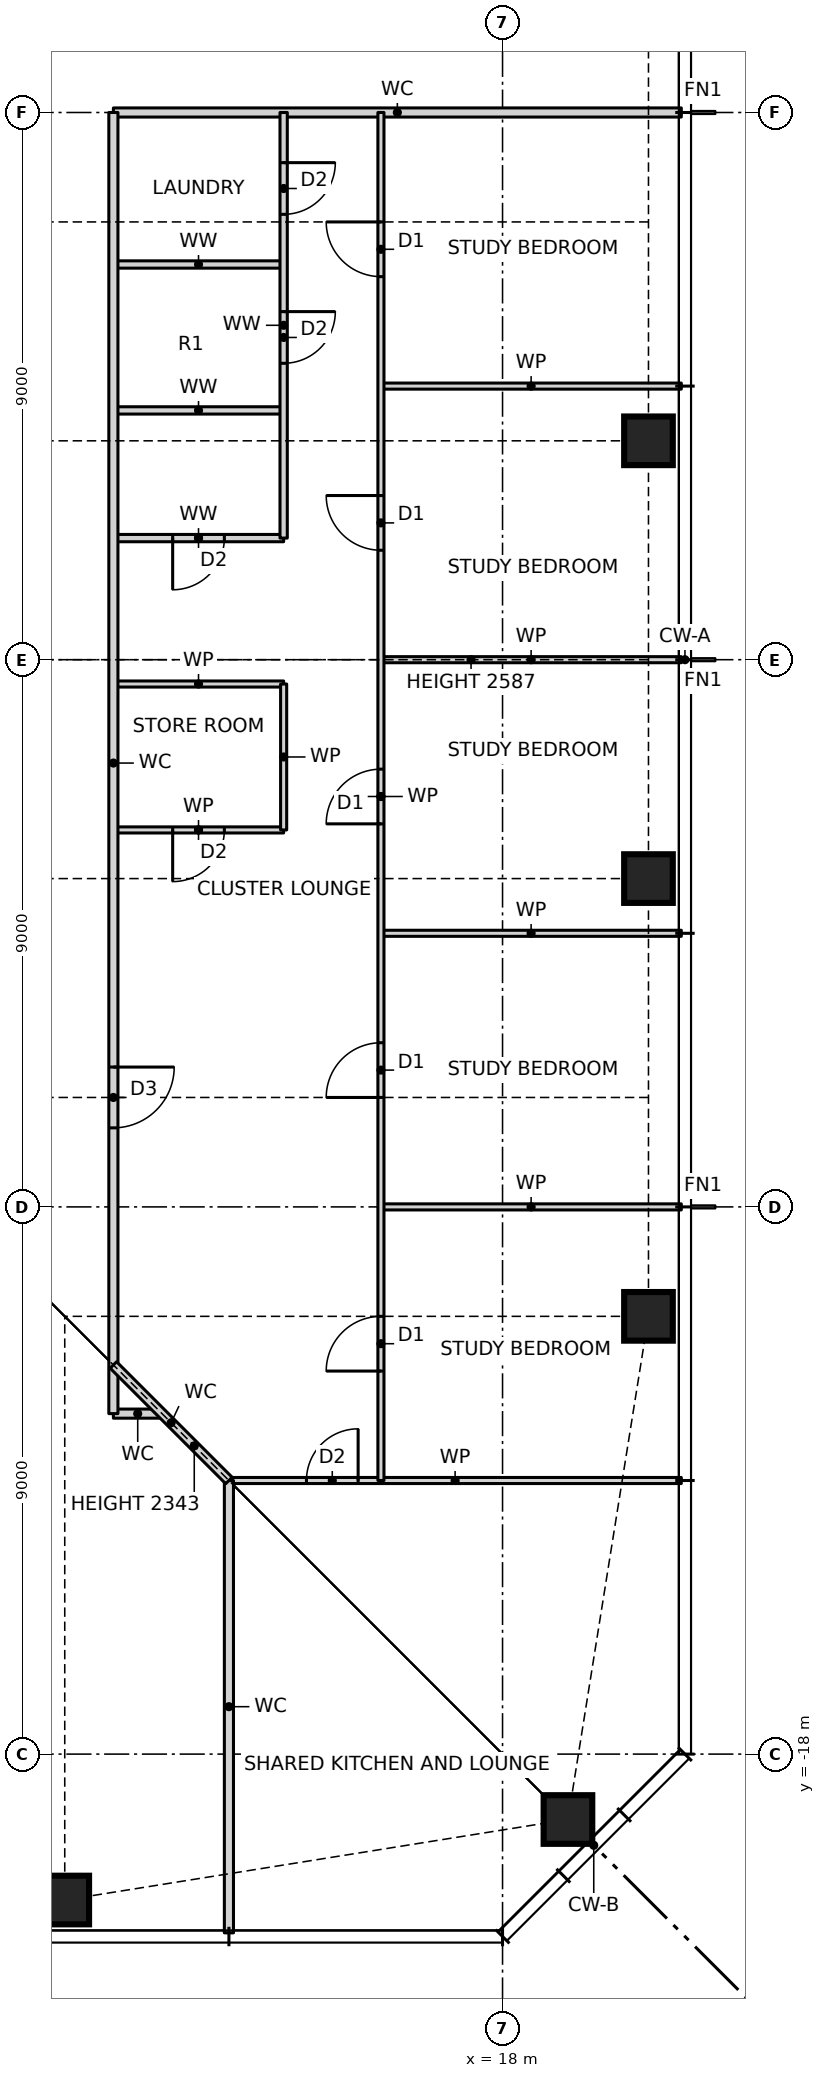
"""IFC4 building model, lengths in metres.
Left out: names, types, materials, properties, quantities, classifications, styles, units other than length and angle.
Written with IfcOpenShell. Run it as: python <this file> out.ifc"""

import sys

from ifc_helpers import new_model, si_unit, direction, frame, frame_2d, origin, origin_2d, place, context, subcontext, project, spatial, rectangle, hollow_rectangle, extrude, element, fill, save


model = new_model("IFC4")
c1 = context("Model", 3, precision=1e-05, world=origin(), true_north=direction((0.0, 1.0)))
c2 = subcontext(c1, "Body", "Model", "MODEL_VIEW")
j1 = project(units=[si_unit("LENGTHUNIT", "METRE"), si_unit("PLANEANGLEUNIT", "RADIAN")], contexts=[c1])
p1 = place(None, origin())
s1 = spatial("IfcSite", under=j1, at=p1, CompositionType="ELEMENT")
p2 = place(p1, origin())
s2 = spatial("IfcBuilding", under=s1, at=p2, CompositionType="ELEMENT")
p3 = place(p2, frame((0.0, 0.0, 91.0)))
s3 = spatial("IfcBuildingStorey", under=s2, at=p3, CompositionType="ELEMENT", Elevation=91.0)
for number, where, z_axis, x_axis in (
    (1, (10.8, -20.4, 0.0), (0.0, 0.0, 1.0), (1.0, 0.0, 0.0)),
    (2, (19.076, -19.076, 0.0), (0.0, 0.0, 1.0), (1.0, 0.0, 0.0)),
    (3, (20.4, -10.8, 0.0), (0.0, 0.0, 1.0), (1.0, 0.0, 0.0)),
    (4, (20.4, -3.6, 0.0), (0.0, 0.0, 1.0), (1.0, 0.0, 0.0)),
    (5, (20.4, 3.6, 0.0), (0.0, 0.0, 1.0), (1.0, 0.0, 0.0)),
):
    element("IfcColumn", number, at=place(p3, frame(where, z_axis=z_axis, x_axis=x_axis)), inside=s3, PredefinedType="COLUMN", context=c2, shape_type="SweptSolid", body=[
        extrude(hollow_rectangle(XDim=0.8, YDim=0.8, WallThickness=0.07, at=origin_2d()), origin(), (0.0, 0.0, 1.0), 3.5),
    ])
p4 = place(p3, frame((13.5, -13.5, 0.0), z_axis=(0.0, 0.0, 1.0), x_axis=(1.0, 0.0, 0.0)))
e6 = element("IfcWall", 6, at=p4, inside=s3, PredefinedType="PARTITIONING", context=c2, shape_type="SweptSolid", body=[
    extrude(rectangle(XDim=7.44, YDim=0.1, at=frame_2d((3.72, 0.0))), origin(), (0.0, 0.0, 1.0), 3.27),
])
p5 = place(p4, frame((1.275, 0.0, 0.0)))
e7 = element("IfcOpeningElement", 7, at=p5, cuts=e6, PredefinedType="OPENING", context=c2, shape_type="SweptSolid", body=[
    extrude(rectangle(XDim=0.85, YDim=2.1, at=frame_2d((0.425, 1.05))), frame((0.0, 0.06, 0.0), z_axis=(0.0, -1.0, 0.0), x_axis=(1.0, 0.0, 0.0)), (0.0, 0.0, 1.0), 0.12),
])
p6 = place(p3, frame((11.6, -12.4, 0.0), z_axis=(0.0, 0.0, 1.0), x_axis=(1.0, 0.0, 0.0)))
e8 = element("IfcWall", 8, at=p6, inside=s3, PredefinedType="PARTITIONING", context=c2, shape_type="SweptSolid", body=[
    extrude(rectangle(XDim=0.8, YDim=0.15, at=frame_2d((0.4, 0.0))), origin(), (0.0, 0.0, 1.0), 3.27),
])
for number, where, z_axis, x_axis in (
    (9, (16.0, -9.0, 0.0), (0.0, 0.0, 1.0), (1.0, 0.0, 0.0)),
    (10, (16.0, -4.5, 0.0), (0.0, 0.0, 1.0), (1.0, 0.0, 0.0)),
):
    element("IfcWall", number, at=place(p3, frame(where, z_axis=z_axis, x_axis=x_axis)), inside=s3, PredefinedType="PARTITIONING", context=c2, shape_type="SweptSolid", body=[
        extrude(rectangle(XDim=4.94, YDim=0.1, at=frame_2d((2.47, 0.0))), origin(), (0.0, 0.0, 1.0), 3.27),
    ])
p7 = place(p3, frame((11.6, -2.8, 0.0), z_axis=(0.0, 0.0, 1.0), x_axis=(1.0, 0.0, 0.0)))
e11 = element("IfcWall", 11, at=p7, inside=s3, PredefinedType="PARTITIONING", context=c2, shape_type="SweptSolid", body=[
    extrude(rectangle(XDim=2.8, YDim=0.1, at=frame_2d((1.4, 0.0))), origin(), (0.0, 0.0, 1.0), 3.27),
])
p8 = place(p7, frame((0.975, 0.0, 0.0)))
e12 = element("IfcOpeningElement", 12, at=p8, cuts=e11, PredefinedType="OPENING", context=c2, shape_type="SweptSolid", body=[
    extrude(rectangle(XDim=0.85, YDim=2.1, at=frame_2d((0.425, 1.05))), frame((0.0, 0.06, 0.0), z_axis=(0.0, -1.0, 0.0), x_axis=(1.0, 0.0, 0.0)), (0.0, 0.0, 1.0), 0.12),
])
p9 = place(p3, frame((11.6, -0.4, 0.0), z_axis=(0.0, 0.0, 1.0), x_axis=(1.0, 0.0, 0.0)))
e13 = element("IfcWall", 13, at=p9, inside=s3, PredefinedType="PARTITIONING", context=c2, shape_type="SweptSolid", body=[
    extrude(rectangle(XDim=2.8, YDim=0.1, at=frame_2d((1.4, 0.0))), origin(), (0.0, 0.0, 1.0), 3.27),
])
p10 = place(p3, frame((16.0, 0.0, 0.0), z_axis=(0.0, 0.0, 1.0), x_axis=(1.0, 0.0, 0.0)))
e14 = element("IfcWall", 14, at=p10, inside=s3, PredefinedType="PARTITIONING", context=c2, shape_type="SweptSolid", body=[
    extrude(rectangle(XDim=4.94, YDim=0.1, at=frame_2d((2.47, 0.0))), origin(), (0.0, 0.0, 1.0), 2.587),
])
p11 = place(p3, frame((11.6, 2.0, 0.0), z_axis=(0.0, 0.0, 1.0), x_axis=(1.0, 0.0, 0.0)))
e15 = element("IfcWall", 15, at=p11, inside=s3, PredefinedType="PARTITIONING", context=c2, shape_type="SweptSolid", body=[
    extrude(rectangle(XDim=2.8, YDim=0.12, at=frame_2d((1.4, 0.0))), origin(), (0.0, 0.0, 1.0), 3.27),
])
p12 = place(p11, frame((0.975, 0.0, 0.0)))
e16 = element("IfcOpeningElement", 16, at=p12, cuts=e15, PredefinedType="OPENING", context=c2, shape_type="SweptSolid", body=[
    extrude(rectangle(XDim=0.85, YDim=2.1, at=frame_2d((0.425, 1.05))), frame((0.0, 0.07, 0.0), z_axis=(0.0, -1.0, 0.0), x_axis=(1.0, 0.0, 0.0)), (0.0, 0.0, 1.0), 0.14),
])
p13 = place(p3, frame((11.6, 4.1, 0.0), z_axis=(0.0, 0.0, 1.0), x_axis=(1.0, 0.0, 0.0)))
e17 = element("IfcWall", 17, at=p13, inside=s3, PredefinedType="PARTITIONING", context=c2, shape_type="SweptSolid", body=[
    extrude(rectangle(XDim=2.8, YDim=0.12, at=frame_2d((1.4, 0.0))), origin(), (0.0, 0.0, 1.0), 3.27),
])
p14 = place(p3, frame((16.0, 4.5, 0.0), z_axis=(0.0, 0.0, 1.0), x_axis=(1.0, 0.0, 0.0)))
e18 = element("IfcWall", 18, at=p14, inside=s3, PredefinedType="PARTITIONING", context=c2, shape_type="SweptSolid", body=[
    extrude(rectangle(XDim=4.94, YDim=0.1, at=frame_2d((2.47, 0.0))), origin(), (0.0, 0.0, 1.0), 3.27),
])
p15 = place(p3, frame((11.6, 6.5, 0.0), z_axis=(0.0, 0.0, 1.0), x_axis=(1.0, 0.0, 0.0)))
e19 = element("IfcWall", 19, at=p15, inside=s3, PredefinedType="PARTITIONING", context=c2, shape_type="SweptSolid", body=[
    extrude(rectangle(XDim=2.8, YDim=0.12, at=frame_2d((1.4, 0.0))), origin(), (0.0, 0.0, 1.0), 3.27),
])
p16 = place(p3, frame((11.6, 9.0, 0.0), z_axis=(0.0, 0.0, 1.0), x_axis=(1.0, 0.0, 0.0)))
e20 = element("IfcWall", 20, at=p16, inside=s3, PredefinedType="PARTITIONING", context=c2, shape_type="SweptSolid", body=[
    extrude(rectangle(XDim=9.34, YDim=0.15, at=frame_2d((4.67, 0.0))), origin(), (0.0, 0.0, 1.0), 3.27),
])
p17 = place(p3, frame((16.0, -13.5, 0.0), z_axis=(0.0, 0.0, 1.0), x_axis=(0.0, 1.0, 0.0)))
e21 = element("IfcWall", 21, at=p17, inside=s3, PredefinedType="PARTITIONING", context=c2, shape_type="SweptSolid", body=[
    extrude(rectangle(XDim=22.5, YDim=0.1, at=frame_2d((11.25, 0.0))), origin(), (0.0, 0.0, 1.0), 3.27),
])
p18 = place(p17, frame((1.8, 0.0, 0.0)))
e22 = element("IfcOpeningElement", 22, at=p18, cuts=e21, PredefinedType="OPENING", context=c2, shape_type="SweptSolid", body=[
    extrude(rectangle(XDim=0.9, YDim=2.1, at=frame_2d((0.45, 1.05))), frame((0.0, 0.06, 0.0), z_axis=(0.0, -1.0, 0.0), x_axis=(1.0, 0.0, 0.0)), (0.0, 0.0, 1.0), 0.12),
])
p19 = place(p17, frame((6.3, 0.0, 0.0)))
e23 = element("IfcOpeningElement", 23, at=p19, cuts=e21, PredefinedType="OPENING", context=c2, shape_type="SweptSolid", body=[
    extrude(rectangle(XDim=0.9, YDim=2.1, at=frame_2d((0.45, 1.05))), frame((0.0, 0.06, 0.0), z_axis=(0.0, -1.0, 0.0), x_axis=(1.0, 0.0, 0.0)), (0.0, 0.0, 1.0), 0.12),
])
p20 = place(p17, frame((10.8, 0.0, 0.0)))
e24 = element("IfcOpeningElement", 24, at=p20, cuts=e21, PredefinedType="OPENING", context=c2, shape_type="SweptSolid", body=[
    extrude(rectangle(XDim=0.9, YDim=2.1, at=frame_2d((0.45, 1.05))), frame((0.0, 0.06, 0.0), z_axis=(0.0, -1.0, 0.0), x_axis=(1.0, 0.0, 0.0)), (0.0, 0.0, 1.0), 0.12),
])
p21 = place(p17, frame((15.3, 0.0, 0.0)))
e25 = element("IfcOpeningElement", 25, at=p21, cuts=e21, PredefinedType="OPENING", context=c2, shape_type="SweptSolid", body=[
    extrude(rectangle(XDim=0.9, YDim=2.1, at=frame_2d((0.45, 1.05))), frame((0.0, 0.06, 0.0), z_axis=(0.0, -1.0, 0.0), x_axis=(1.0, 0.0, 0.0)), (0.0, 0.0, 1.0), 0.12),
])
p22 = place(p17, frame((19.8, 0.0, 0.0)))
e26 = element("IfcOpeningElement", 26, at=p22, cuts=e21, PredefinedType="OPENING", context=c2, shape_type="SweptSolid", body=[
    extrude(rectangle(XDim=0.9, YDim=2.1, at=frame_2d((0.45, 1.05))), frame((0.0, 0.06, 0.0), z_axis=(0.0, -1.0, 0.0), x_axis=(1.0, 0.0, 0.0)), (0.0, 0.0, 1.0), 0.12),
])
p23 = place(p3, frame((14.4, -2.8, 0.0), z_axis=(0.0, 0.0, 1.0), x_axis=(0.0, 1.0, 0.0)))
e27 = element("IfcWall", 27, at=p23, inside=s3, PredefinedType="PARTITIONING", context=c2, shape_type="SweptSolid", body=[
    extrude(rectangle(XDim=2.4, YDim=0.1, at=frame_2d((1.2, 0.0))), origin(), (0.0, 0.0, 1.0), 3.27),
])
p24 = place(p3, frame((14.4, 2.0, 0.0), z_axis=(0.0, 0.0, 1.0), x_axis=(0.0, 1.0, 0.0)))
e28 = element("IfcWall", 28, at=p24, inside=s3, PredefinedType="PARTITIONING", context=c2, shape_type="SweptSolid", body=[
    extrude(rectangle(XDim=7.0, YDim=0.12, at=frame_2d((3.5, 0.0))), origin(), (0.0, 0.0, 1.0), 3.27),
])
p25 = place(p24, frame((2.875, 0.0, 0.0)))
e29 = element("IfcOpeningElement", 29, at=p25, cuts=e28, PredefinedType="OPENING", context=c2, shape_type="SweptSolid", body=[
    extrude(rectangle(XDim=0.85, YDim=2.1, at=frame_2d((0.425, 1.05))), frame((0.0, 0.07, 0.0), z_axis=(0.0, -1.0, 0.0), x_axis=(1.0, 0.0, 0.0)), (0.0, 0.0, 1.0), 0.14),
])
p26 = place(p24, frame((5.325, 0.0, 0.0)))
e30 = element("IfcOpeningElement", 30, at=p26, cuts=e28, PredefinedType="OPENING", context=c2, shape_type="SweptSolid", body=[
    extrude(rectangle(XDim=0.85, YDim=2.1, at=frame_2d((0.425, 1.05))), frame((0.0, 0.07, 0.0), z_axis=(0.0, -1.0, 0.0), x_axis=(1.0, 0.0, 0.0)), (0.0, 0.0, 1.0), 0.14),
])
p27 = place(p3, frame((13.5, -20.94, 0.0), z_axis=(0.0, 0.0, 1.0), x_axis=(0.0, 1.0, 0.0)))
e31 = element("IfcWall", 31, at=p27, inside=s3, PredefinedType="PARTITIONING", context=c2, shape_type="SweptSolid", body=[
    extrude(rectangle(XDim=7.44, YDim=0.15, at=frame_2d((3.72, 0.0))), origin(), (0.0, 0.0, 1.0), 3.27),
])
p28 = place(p3, frame((11.6, -12.4, 0.0), z_axis=(0.0, 0.0, 1.0), x_axis=(0.0, 1.0, 0.0)))
e32 = element("IfcWall", 32, at=p28, inside=s3, PredefinedType="PARTITIONING", context=c2, shape_type="SweptSolid", body=[
    extrude(rectangle(XDim=21.4, YDim=0.15, at=frame_2d((10.7, 0.0))), origin(), (0.0, 0.0, 1.0), 3.27),
])
p29 = place(p28, frame((4.7, 0.0, 0.0)))
e33 = element("IfcOpeningElement", 33, at=p29, cuts=e32, PredefinedType="OPENING", context=c2, shape_type="SweptSolid", body=[
    extrude(rectangle(XDim=1.0, YDim=2.1, at=frame_2d((0.5, 1.05))), frame((0.0, 0.085, 0.0), z_axis=(0.0, -1.0, 0.0), x_axis=(1.0, 0.0, 0.0)), (0.0, 0.0, 1.0), 0.17),
])
p30 = place(p3, frame((13.5, -13.5, 0.0), z_axis=(0.0, 0.0, 1.0), x_axis=(-0.707106781187, 0.707106781187, 0.0)))
e34 = element("IfcWall", 34, at=p30, inside=s3, PredefinedType="PARTITIONING", context=c2, shape_type="SweptSolid", body=[
    extrude(rectangle(XDim=2.687, YDim=0.15, at=frame_2d((1.343, 0.0))), origin(), (0.0, 0.0, 1.0), 2.343),
])
p31 = place(p18, origin())
e35 = element("IfcDoor", 35, at=p31, inside=s3, OperationType="SINGLE_SWING_LEFT", PredefinedType="DOOR", context=c2, shape_type="SweptSolid", body=[
    extrude(rectangle(XDim=0.9, YDim=2.1, at=frame_2d((0.45, 1.05))), frame((0.0, 0.025, 0.0), z_axis=(0.0, -1.0, 0.0), x_axis=(1.0, 0.0, 0.0)), (0.0, 0.0, 1.0), 0.05),
])
fill(e22, e35)
p32 = place(p19, origin())
e36 = element("IfcDoor", 36, at=p32, inside=s3, OperationType="SINGLE_SWING_LEFT", PredefinedType="DOOR", context=c2, shape_type="SweptSolid", body=[
    extrude(rectangle(XDim=0.9, YDim=2.1, at=frame_2d((0.45, 1.05))), frame((0.0, 0.025, 0.0), z_axis=(0.0, -1.0, 0.0), x_axis=(1.0, 0.0, 0.0)), (0.0, 0.0, 1.0), 0.05),
])
fill(e23, e36)
p33 = place(p20, origin())
e37 = element("IfcDoor", 37, at=p33, inside=s3, OperationType="SINGLE_SWING_LEFT", PredefinedType="DOOR", context=c2, shape_type="SweptSolid", body=[
    extrude(rectangle(XDim=0.9, YDim=2.1, at=frame_2d((0.45, 1.05))), frame((0.0, 0.025, 0.0), z_axis=(0.0, -1.0, 0.0), x_axis=(1.0, 0.0, 0.0)), (0.0, 0.0, 1.0), 0.05),
])
fill(e24, e37)
p34 = place(p21, origin())
e38 = element("IfcDoor", 38, at=p34, inside=s3, OperationType="SINGLE_SWING_RIGHT", PredefinedType="DOOR", context=c2, shape_type="SweptSolid", body=[
    extrude(rectangle(XDim=0.9, YDim=2.1, at=frame_2d((0.45, 1.05))), frame((0.0, 0.025, 0.0), z_axis=(0.0, -1.0, 0.0), x_axis=(1.0, 0.0, 0.0)), (0.0, 0.0, 1.0), 0.05),
])
fill(e25, e38)
p35 = place(p22, origin())
e39 = element("IfcDoor", 39, at=p35, inside=s3, OperationType="SINGLE_SWING_RIGHT", PredefinedType="DOOR", context=c2, shape_type="SweptSolid", body=[
    extrude(rectangle(XDim=0.9, YDim=2.1, at=frame_2d((0.45, 1.05))), frame((0.0, 0.025, 0.0), z_axis=(0.0, -1.0, 0.0), x_axis=(1.0, 0.0, 0.0)), (0.0, 0.0, 1.0), 0.05),
])
fill(e26, e39)
p36 = place(p29, frame((1.0, 0.0, 0.0), z_axis=(0.0, 0.0, 1.0), x_axis=(-1.0, 0.0, 0.0)))
e40 = element("IfcDoor", 40, at=p36, inside=s3, OperationType="SINGLE_SWING_LEFT", PredefinedType="DOOR", context=c2, shape_type="SweptSolid", body=[
    extrude(rectangle(XDim=1.0, YDim=2.1, at=frame_2d((0.5, 1.05))), frame((0.0, 0.025, 0.0), z_axis=(0.0, -1.0, 0.0), x_axis=(1.0, 0.0, 0.0)), (0.0, 0.0, 1.0), 0.05),
])
fill(e33, e40)
p37 = place(p8, frame((0.85, 0.0, 0.0), z_axis=(0.0, 0.0, 1.0), x_axis=(-1.0, 0.0, 0.0)))
e41 = element("IfcDoor", 41, at=p37, inside=s3, OperationType="SINGLE_SWING_RIGHT", PredefinedType="DOOR", context=c2, shape_type="SweptSolid", body=[
    extrude(rectangle(XDim=0.85, YDim=2.1, at=frame_2d((0.425, 1.05))), frame((0.0, 0.025, 0.0), z_axis=(0.0, -1.0, 0.0), x_axis=(1.0, 0.0, 0.0)), (0.0, 0.0, 1.0), 0.05),
])
fill(e12, e41)
p38 = place(p12, frame((0.85, 0.0, 0.0), z_axis=(0.0, 0.0, 1.0), x_axis=(-1.0, 0.0, 0.0)))
e42 = element("IfcDoor", 42, at=p38, inside=s3, OperationType="SINGLE_SWING_RIGHT", PredefinedType="DOOR", context=c2, shape_type="SweptSolid", body=[
    extrude(rectangle(XDim=0.85, YDim=2.1, at=frame_2d((0.425, 1.05))), frame((0.0, 0.025, 0.0), z_axis=(0.0, -1.0, 0.0), x_axis=(1.0, 0.0, 0.0)), (0.0, 0.0, 1.0), 0.05),
])
fill(e16, e42)
p39 = place(p25, frame((0.85, 0.0, 0.0), z_axis=(0.0, 0.0, 1.0), x_axis=(-1.0, 0.0, 0.0)))
e43 = element("IfcDoor", 43, at=p39, inside=s3, OperationType="SINGLE_SWING_LEFT", PredefinedType="DOOR", context=c2, shape_type="SweptSolid", body=[
    extrude(rectangle(XDim=0.85, YDim=2.1, at=frame_2d((0.425, 1.05))), frame((0.0, 0.025, 0.0), z_axis=(0.0, -1.0, 0.0), x_axis=(1.0, 0.0, 0.0)), (0.0, 0.0, 1.0), 0.05),
])
fill(e29, e43)
p40 = place(p26, frame((0.85, 0.0, 0.0), z_axis=(0.0, 0.0, 1.0), x_axis=(-1.0, 0.0, 0.0)))
e44 = element("IfcDoor", 44, at=p40, inside=s3, OperationType="SINGLE_SWING_LEFT", PredefinedType="DOOR", context=c2, shape_type="SweptSolid", body=[
    extrude(rectangle(XDim=0.85, YDim=2.1, at=frame_2d((0.425, 1.05))), frame((0.0, 0.025, 0.0), z_axis=(0.0, -1.0, 0.0), x_axis=(1.0, 0.0, 0.0)), (0.0, 0.0, 1.0), 0.05),
])
fill(e30, e44)
p41 = place(p5, origin())
e45 = element("IfcDoor", 45, at=p41, inside=s3, OperationType="SINGLE_SWING_RIGHT", PredefinedType="DOOR", context=c2, shape_type="SweptSolid", body=[
    extrude(rectangle(XDim=0.85, YDim=2.1, at=frame_2d((0.425, 1.05))), frame((0.0, 0.025, 0.0), z_axis=(0.0, -1.0, 0.0), x_axis=(1.0, 0.0, 0.0)), (0.0, 0.0, 1.0), 0.05),
])
fill(e7, e45)
save(model, sys.argv[1])
